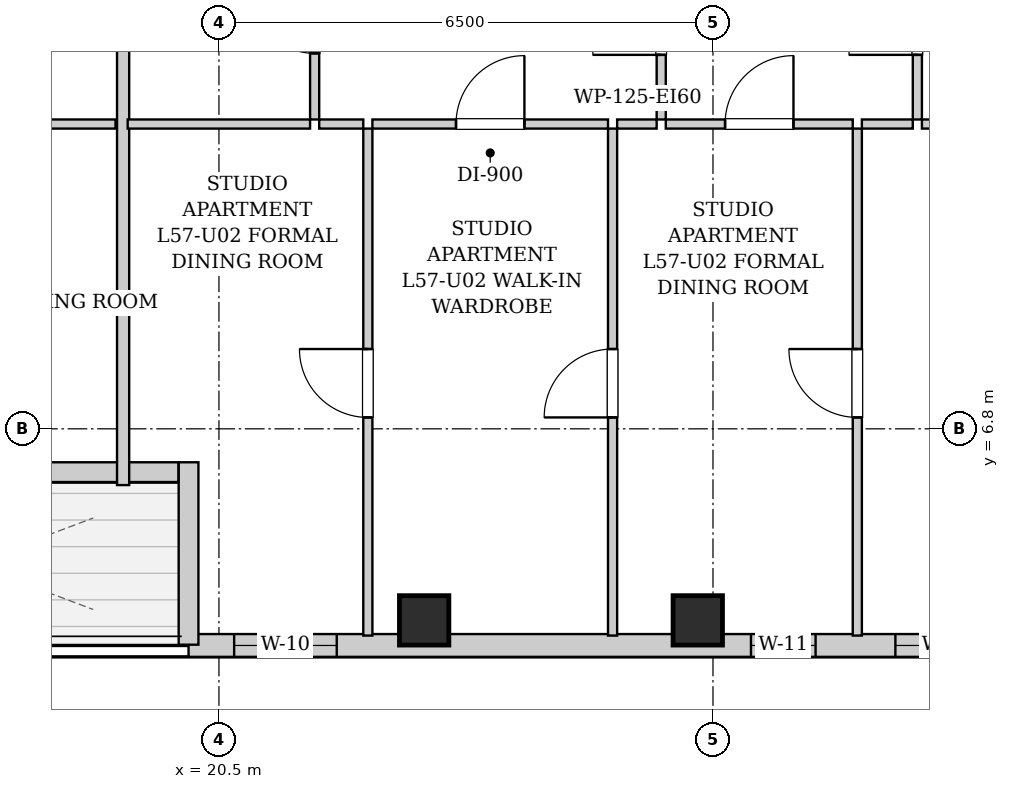
"""IFC4 building model, lengths in metres.
Left out: names, types, materials, properties, quantities, classifications, styles, units other than length and angle.
Written with IfcOpenShell. Run it as: python <this file> out.ifc"""

import sys

from ifc_helpers import new_model, si_unit, direction, frame, frame_2d, origin, origin_2d, place, context, subcontext, project, spatial, rectangle, extrude, element, fill, save


model = new_model("IFC4")
c1 = context("Model", 3, precision=1e-05, world=origin(), true_north=direction((0.0, 1.0)))
c2 = subcontext(c1, "Body", "Model", "MODEL_VIEW")
j1 = project(units=[si_unit("LENGTHUNIT", "METRE"), si_unit("PLANEANGLEUNIT", "RADIAN")], contexts=[c1])
p1 = place(None, origin())
s1 = spatial("IfcSite", under=j1, at=p1, CompositionType="ELEMENT")
p2 = place(p1, origin())
s2 = spatial("IfcBuilding", under=s1, at=p2, CompositionType="ELEMENT")
p3 = place(p2, frame((0.0, 0.0, 197.5)))
s3 = spatial("IfcBuildingStorey", under=s2, at=p3, CompositionType="ELEMENT", Elevation=197.5)
for number, where, z_axis, x_axis in (
    (1, (23.2, 4.28, 0.0), (0.0, 0.0, 1.0), (1.0, 0.0, 0.0)),
    (2, (26.8, 4.28, 0.0), (0.0, 0.0, 1.0), (1.0, 0.0, 0.0)),
):
    element("IfcColumn", number, at=place(p3, frame(where, z_axis=z_axis, x_axis=x_axis)), inside=s3, PredefinedType="COLUMN", context=c2, shape_type="SweptSolid", body=[
        extrude(rectangle(XDim=0.65, YDim=0.65, at=origin_2d()), origin(), (0.0, 0.0, 1.0), 3.3),
    ])
p4 = place(p3, frame((31.5, 3.95, 0.0), z_axis=(0.0, 0.0, 1.0), x_axis=(-1.0, 0.0, 0.0)))
e3 = element("IfcWall", 3, at=p4, inside=s3, PredefinedType="SOLIDWALL", context=c2, shape_type="SweptSolid", body=[
    extrude(rectangle(XDim=11.4, YDim=0.3, at=frame_2d((5.7, 0.0))), origin(), (0.0, 0.0, 1.0), 3.04),
])
p5 = place(p4, frame((9.45, 0.0, 0.55)))
e4 = element("IfcOpeningElement", 4, at=p5, cuts=e3, PredefinedType="OPENING", context=c2, shape_type="SweptSolid", body=[
    extrude(rectangle(XDim=1.35, YDim=1.2, at=frame_2d((0.675, 0.6))), frame((0.0, 0.16, 0.0), z_axis=(0.0, -1.0, 0.0), x_axis=(1.0, 0.0, 0.0)), (0.0, 0.0, 1.0), 0.32),
])
p6 = place(p4, frame((3.15, 0.0, 0.55)))
e5 = element("IfcOpeningElement", 5, at=p6, cuts=e3, PredefinedType="OPENING", context=c2, shape_type="SweptSolid", body=[
    extrude(rectangle(XDim=0.85, YDim=1.2, at=frame_2d((0.425, 0.6))), frame((0.0, 0.16, 0.0), z_axis=(0.0, -1.0, 0.0), x_axis=(1.0, 0.0, 0.0)), (0.0, 0.0, 1.0), 0.32),
])
p7 = place(p4, frame((0.75, 0.0, 0.55)))
e6 = element("IfcOpeningElement", 6, at=p7, cuts=e3, PredefinedType="OPENING", context=c2, shape_type="SweptSolid", body=[
    extrude(rectangle(XDim=1.35, YDim=1.2, at=frame_2d((0.675, 0.6))), frame((0.0, 0.16, 0.0), z_axis=(0.0, -1.0, 0.0), x_axis=(1.0, 0.0, 0.0)), (0.0, 0.0, 1.0), 0.32),
])
p8 = place(p3, frame((20.1, 3.96, 0.0), z_axis=(0.0, 0.0, 1.0), x_axis=(0.0, 1.0, 0.0)))
e7 = element("IfcWall", 7, at=p8, inside=s3, PredefinedType="SOLIDWALL", context=c2, shape_type="SweptSolid", body=[
    extrude(rectangle(XDim=2.4, YDim=0.26, at=frame_2d((1.2, 0.0))), origin(), (0.0, 0.0, 1.0), 3.04),
])
p9 = place(p3, frame((19.966, 6.23, 0.0), z_axis=(0.0, 0.0, 1.0), x_axis=(-1.0, 0.0, 0.0)))
e8 = element("IfcWall", 8, at=p9, inside=s3, PredefinedType="SOLIDWALL", context=c2, shape_type="SweptSolid", body=[
    extrude(rectangle(XDim=5.432, YDim=0.26, at=frame_2d((2.716, 0.0))), origin(), (0.0, 0.0, 1.0), 3.04),
])
p10 = place(p9, frame((2.166, 0.0, 0.0)))
e9 = element("IfcOpeningElement", 9, at=p10, cuts=e8, PredefinedType="OPENING", context=c2, shape_type="SweptSolid", body=[
    extrude(rectangle(XDim=1.1, YDim=2.0, at=frame_2d((0.55, 1.0))), frame((0.0, 0.14, 0.0), z_axis=(0.0, -1.0, 0.0), x_axis=(1.0, 0.0, 0.0)), (0.0, 0.0, 1.0), 0.28),
])
p11 = place(p3, frame((15.15, 10.81, 0.0), z_axis=(0.0, 0.0, 1.0), x_axis=(1.0, 0.0, 0.0)))
e10 = element("IfcWall", 10, at=p11, inside=s3, PredefinedType="PARTITIONING", context=c2, shape_type="SweptSolid", body=[
    extrude(rectangle(XDim=3.989, YDim=0.12, at=frame_2d((1.995, 0.0))), origin(), (0.0, 0.0, 1.0), 3.04),
])
p12 = place(p11, frame((1.544, 0.0, 0.0)))
e11 = element("IfcOpeningElement", 11, at=p12, cuts=e10, PredefinedType="OPENING", context=c2, shape_type="SweptSolid", body=[
    extrude(rectangle(XDim=0.9, YDim=2.05, at=frame_2d((0.45, 1.025))), frame((0.0, 0.07, 0.0), z_axis=(0.0, -1.0, 0.0), x_axis=(1.0, 0.0, 0.0)), (0.0, 0.0, 1.0), 0.14),
])
p13 = place(p3, frame((19.239, 6.06, 0.0), z_axis=(0.0, 0.0, 1.0), x_axis=(0.0, 1.0, 0.0)))
e12 = element("IfcWall", 12, at=p13, inside=s3, PredefinedType="PARTITIONING", context=c2, shape_type="SweptSolid", body=[
    extrude(rectangle(XDim=7.41, YDim=0.16, at=frame_2d((3.705, 0.0))), origin(), (0.0, 0.0, 1.0), 3.04),
])
p14 = place(p3, frame((21.759, 10.87, 0.0), z_axis=(0.0, 0.0, 1.0), x_axis=(0.0, 1.0, 0.0)))
e13 = element("IfcWall", 13, at=p14, inside=s3, PredefinedType="PARTITIONING", context=c2, shape_type="SweptSolid", body=[
    extrude(rectangle(XDim=2.6, YDim=0.12, at=frame_2d((1.3, 0.0))), origin(), (0.0, 0.0, 1.0), 3.04),
])
p15 = place(p14, frame((0.87, 0.0, 0.0)))
e14 = element("IfcOpeningElement", 14, at=p15, cuts=e13, PredefinedType="OPENING", context=c2, shape_type="SweptSolid", body=[
    extrude(rectangle(XDim=0.86, YDim=2.05, at=frame_2d((0.43, 1.025))), frame((0.0, 0.07, 0.0), z_axis=(0.0, -1.0, 0.0), x_axis=(1.0, 0.0, 0.0)), (0.0, 0.0, 1.0), 0.14),
])
p16 = place(p3, frame((19.299, 10.81, 0.0), z_axis=(0.0, 0.0, 1.0), x_axis=(1.0, 0.0, 0.0)))
e15 = element("IfcWall", 15, at=p16, inside=s3, PredefinedType="PARTITIONING", context=c2, shape_type="SweptSolid", body=[
    extrude(rectangle(XDim=2.4, YDim=0.12, at=frame_2d((1.2, 0.0))), origin(), (0.0, 0.0, 1.0), 3.04),
])
p17 = place(p3, frame((26.319, 10.87, 0.0), z_axis=(0.0, 0.0, 1.0), x_axis=(0.0, 1.0, 0.0)))
e16 = element("IfcWall", 16, at=p17, inside=s3, PredefinedType="PARTITIONING", context=c2, shape_type="SweptSolid", body=[
    extrude(rectangle(XDim=2.6, YDim=0.12, at=frame_2d((1.3, 0.0))), origin(), (0.0, 0.0, 1.0), 3.04),
])
p18 = place(p17, frame((0.85, 0.0, 0.0)))
e17 = element("IfcOpeningElement", 17, at=p18, cuts=e16, PredefinedType="OPENING", context=c2, shape_type="SweptSolid", body=[
    extrude(rectangle(XDim=0.9, YDim=2.05, at=frame_2d((0.45, 1.025))), frame((0.0, 0.07, 0.0), z_axis=(0.0, -1.0, 0.0), x_axis=(1.0, 0.0, 0.0)), (0.0, 0.0, 1.0), 0.14),
])
p19 = place(p3, frame((21.819, 10.81, 0.0), z_axis=(0.0, 0.0, 1.0), x_axis=(1.0, 0.0, 0.0)))
e18 = element("IfcWall", 18, at=p19, inside=s3, PredefinedType="PARTITIONING", context=c2, shape_type="SweptSolid", body=[
    extrude(rectangle(XDim=0.58, YDim=0.12, at=frame_2d((0.29, 0.0))), origin(), (0.0, 0.0, 1.0), 3.04),
])
p20 = place(p3, frame((22.519, 10.81, 0.0), z_axis=(0.0, 0.0, 1.0), x_axis=(1.0, 0.0, 0.0)))
e19 = element("IfcWall", 19, at=p20, inside=s3, PredefinedType="PARTITIONING", context=c2, shape_type="SweptSolid", body=[
    extrude(rectangle(XDim=3.1, YDim=0.12, at=frame_2d((1.55, 0.0))), origin(), (0.0, 0.0, 1.0), 3.04),
])
p21 = place(p20, frame((1.1, 0.0, 0.0)))
e20 = element("IfcOpeningElement", 20, at=p21, cuts=e19, PredefinedType="OPENING", context=c2, shape_type="SweptSolid", body=[
    extrude(rectangle(XDim=0.9, YDim=2.05, at=frame_2d((0.45, 1.025))), frame((0.0, 0.07, 0.0), z_axis=(0.0, -1.0, 0.0), x_axis=(1.0, 0.0, 0.0)), (0.0, 0.0, 1.0), 0.14),
])
p22 = place(p3, frame((25.739, 10.81, 0.0), z_axis=(0.0, 0.0, 1.0), x_axis=(1.0, 0.0, 0.0)))
e21 = element("IfcWall", 21, at=p22, inside=s3, PredefinedType="PARTITIONING", context=c2, shape_type="SweptSolid", body=[
    extrude(rectangle(XDim=0.52, YDim=0.12, at=frame_2d((0.26, 0.0))), origin(), (0.0, 0.0, 1.0), 3.04),
])
p23 = place(p3, frame((29.689, 10.87, 0.0), z_axis=(0.0, 0.0, 1.0), x_axis=(0.0, 1.0, 0.0)))
e22 = element("IfcWall", 22, at=p23, inside=s3, PredefinedType="PARTITIONING", context=c2, shape_type="SweptSolid", body=[
    extrude(rectangle(XDim=2.6, YDim=0.12, at=frame_2d((1.3, 0.0))), origin(), (0.0, 0.0, 1.0), 3.04),
])
p24 = place(p23, frame((0.85, 0.0, 0.0)))
e23 = element("IfcOpeningElement", 23, at=p24, cuts=e22, PredefinedType="OPENING", context=c2, shape_type="SweptSolid", body=[
    extrude(rectangle(XDim=0.9, YDim=2.05, at=frame_2d((0.45, 1.025))), frame((0.0, 0.07, 0.0), z_axis=(0.0, -1.0, 0.0), x_axis=(1.0, 0.0, 0.0)), (0.0, 0.0, 1.0), 0.14),
])
p25 = place(p3, frame((26.379, 10.81, 0.0), z_axis=(0.0, 0.0, 1.0), x_axis=(1.0, 0.0, 0.0)))
e24 = element("IfcWall", 24, at=p25, inside=s3, PredefinedType="PARTITIONING", context=c2, shape_type="SweptSolid", body=[
    extrude(rectangle(XDim=2.46, YDim=0.12, at=frame_2d((1.23, 0.0))), origin(), (0.0, 0.0, 1.0), 3.04),
])
p26 = place(p25, frame((0.78, 0.0, 0.0)))
e25 = element("IfcOpeningElement", 25, at=p26, cuts=e24, PredefinedType="OPENING", context=c2, shape_type="SweptSolid", body=[
    extrude(rectangle(XDim=0.9, YDim=2.05, at=frame_2d((0.45, 1.025))), frame((0.0, 0.07, 0.0), z_axis=(0.0, -1.0, 0.0), x_axis=(1.0, 0.0, 0.0)), (0.0, 0.0, 1.0), 0.14),
])
p27 = place(p3, frame((28.959, 10.81, 0.0), z_axis=(0.0, 0.0, 1.0), x_axis=(1.0, 0.0, 0.0)))
e26 = element("IfcWall", 26, at=p27, inside=s3, PredefinedType="PARTITIONING", context=c2, shape_type="SweptSolid", body=[
    extrude(rectangle(XDim=0.67, YDim=0.12, at=frame_2d((0.335, 0.0))), origin(), (0.0, 0.0, 1.0), 3.04),
])
p28 = place(p3, frame((29.749, 10.81, 0.0), z_axis=(0.0, 0.0, 1.0), x_axis=(1.0, 0.0, 0.0)))
e27 = element("IfcWall", 27, at=p28, inside=s3, PredefinedType="PARTITIONING", context=c2, shape_type="SweptSolid", body=[
    extrude(rectangle(XDim=2.31, YDim=0.12, at=frame_2d((1.155, 0.0))), origin(), (0.0, 0.0, 1.0), 3.04),
])
p29 = place(p28, frame((0.705, 0.0, 0.0)))
e28 = element("IfcOpeningElement", 28, at=p29, cuts=e27, PredefinedType="OPENING", context=c2, shape_type="SweptSolid", body=[
    extrude(rectangle(XDim=0.9, YDim=2.05, at=frame_2d((0.45, 1.025))), frame((0.0, 0.07, 0.0), z_axis=(0.0, -1.0, 0.0), x_axis=(1.0, 0.0, 0.0)), (0.0, 0.0, 1.0), 0.14),
])
p30 = place(p3, frame((22.459, 4.08, 0.0), z_axis=(0.0, 0.0, 1.0), x_axis=(0.0, 1.0, 0.0)))
e29 = element("IfcWall", 29, at=p30, inside=s3, PredefinedType="PARTITIONING", context=c2, shape_type="SweptSolid", body=[
    extrude(rectangle(XDim=6.67, YDim=0.12, at=frame_2d((3.335, 0.0))), origin(), (0.0, 0.0, 1.0), 3.04),
])
p31 = place(p30, frame((2.87, 0.0, 0.0)))
e30 = element("IfcOpeningElement", 30, at=p31, cuts=e29, PredefinedType="OPENING", context=c2, shape_type="SweptSolid", body=[
    extrude(rectangle(XDim=0.9, YDim=2.05, at=frame_2d((0.45, 1.025))), frame((0.0, 0.07, 0.0), z_axis=(0.0, -1.0, 0.0), x_axis=(1.0, 0.0, 0.0)), (0.0, 0.0, 1.0), 0.14),
])
p32 = place(p3, frame((25.679, 4.08, 0.0), z_axis=(0.0, 0.0, 1.0), x_axis=(0.0, 1.0, 0.0)))
e31 = element("IfcWall", 31, at=p32, inside=s3, PredefinedType="PARTITIONING", context=c2, shape_type="SweptSolid", body=[
    extrude(rectangle(XDim=6.67, YDim=0.12, at=frame_2d((3.335, 0.0))), origin(), (0.0, 0.0, 1.0), 3.04),
])
p33 = place(p32, frame((2.87, 0.0, 0.0)))
e32 = element("IfcOpeningElement", 32, at=p33, cuts=e31, PredefinedType="OPENING", context=c2, shape_type="SweptSolid", body=[
    extrude(rectangle(XDim=0.9, YDim=2.05, at=frame_2d((0.45, 1.025))), frame((0.0, 0.07, 0.0), z_axis=(0.0, -1.0, 0.0), x_axis=(1.0, 0.0, 0.0)), (0.0, 0.0, 1.0), 0.14),
])
p34 = place(p3, frame((28.899, 4.08, 0.0), z_axis=(0.0, 0.0, 1.0), x_axis=(0.0, 1.0, 0.0)))
e33 = element("IfcWall", 33, at=p34, inside=s3, PredefinedType="PARTITIONING", context=c2, shape_type="SweptSolid", body=[
    extrude(rectangle(XDim=6.67, YDim=0.12, at=frame_2d((3.335, 0.0))), origin(), (0.0, 0.0, 1.0), 3.04),
])
p35 = place(p34, frame((2.87, 0.0, 0.0)))
e34 = element("IfcOpeningElement", 34, at=p35, cuts=e33, PredefinedType="OPENING", context=c2, shape_type="SweptSolid", body=[
    extrude(rectangle(XDim=0.9, YDim=2.05, at=frame_2d((0.45, 1.025))), frame((0.0, 0.07, 0.0), z_axis=(0.0, -1.0, 0.0), x_axis=(1.0, 0.0, 0.0)), (0.0, 0.0, 1.0), 0.14),
])
p36 = place(p15, origin())
e35 = element("IfcDoor", 35, at=p36, inside=s3, OperationType="SINGLE_SWING_RIGHT", PredefinedType="DOOR", context=c2, shape_type="SweptSolid", body=[
    extrude(rectangle(XDim=0.86, YDim=2.05, at=frame_2d((0.43, 1.025))), frame((0.0, 0.025, 0.0), z_axis=(0.0, -1.0, 0.0), x_axis=(1.0, 0.0, 0.0)), (0.0, 0.0, 1.0), 0.05),
])
fill(e14, e35)
p37 = place(p18, origin())
e36 = element("IfcDoor", 36, at=p37, inside=s3, OperationType="SINGLE_SWING_LEFT", PredefinedType="DOOR", context=c2, shape_type="SweptSolid", body=[
    extrude(rectangle(XDim=0.9, YDim=2.05, at=frame_2d((0.45, 1.025))), frame((0.0, 0.025, 0.0), z_axis=(0.0, -1.0, 0.0), x_axis=(1.0, 0.0, 0.0)), (0.0, 0.0, 1.0), 0.05),
])
fill(e17, e36)
p38 = place(p21, origin())
e37 = element("IfcDoor", 37, at=p38, inside=s3, OperationType="SINGLE_SWING_RIGHT", PredefinedType="DOOR", context=c2, shape_type="SweptSolid", body=[
    extrude(rectangle(XDim=0.9, YDim=2.05, at=frame_2d((0.45, 1.025))), frame((0.0, 0.025, 0.0), z_axis=(0.0, -1.0, 0.0), x_axis=(1.0, 0.0, 0.0)), (0.0, 0.0, 1.0), 0.05),
])
fill(e20, e37)
p39 = place(p24, origin())
e38 = element("IfcDoor", 38, at=p39, inside=s3, OperationType="SINGLE_SWING_LEFT", PredefinedType="DOOR", context=c2, shape_type="SweptSolid", body=[
    extrude(rectangle(XDim=0.9, YDim=2.05, at=frame_2d((0.45, 1.025))), frame((0.0, 0.025, 0.0), z_axis=(0.0, -1.0, 0.0), x_axis=(1.0, 0.0, 0.0)), (0.0, 0.0, 1.0), 0.05),
])
fill(e23, e38)
p40 = place(p26, origin())
e39 = element("IfcDoor", 39, at=p40, inside=s3, OperationType="SINGLE_SWING_RIGHT", PredefinedType="DOOR", context=c2, shape_type="SweptSolid", body=[
    extrude(rectangle(XDim=0.9, YDim=2.05, at=frame_2d((0.45, 1.025))), frame((0.0, 0.025, 0.0), z_axis=(0.0, -1.0, 0.0), x_axis=(1.0, 0.0, 0.0)), (0.0, 0.0, 1.0), 0.05),
])
fill(e25, e39)
p41 = place(p31, origin())
e40 = element("IfcDoor", 40, at=p41, inside=s3, OperationType="SINGLE_SWING_RIGHT", PredefinedType="DOOR", context=c2, shape_type="SweptSolid", body=[
    extrude(rectangle(XDim=0.9, YDim=2.05, at=frame_2d((0.45, 1.025))), frame((0.0, 0.025, 0.0), z_axis=(0.0, -1.0, 0.0), x_axis=(1.0, 0.0, 0.0)), (0.0, 0.0, 1.0), 0.05),
])
fill(e30, e40)
p42 = place(p33, origin())
e41 = element("IfcDoor", 41, at=p42, inside=s3, OperationType="SINGLE_SWING_LEFT", PredefinedType="DOOR", context=c2, shape_type="SweptSolid", body=[
    extrude(rectangle(XDim=0.9, YDim=2.05, at=frame_2d((0.45, 1.025))), frame((0.0, 0.025, 0.0), z_axis=(0.0, -1.0, 0.0), x_axis=(1.0, 0.0, 0.0)), (0.0, 0.0, 1.0), 0.05),
])
fill(e32, e41)
p43 = place(p35, origin())
e42 = element("IfcDoor", 42, at=p43, inside=s3, OperationType="SINGLE_SWING_RIGHT", PredefinedType="DOOR", context=c2, shape_type="SweptSolid", body=[
    extrude(rectangle(XDim=0.9, YDim=2.05, at=frame_2d((0.45, 1.025))), frame((0.0, 0.025, 0.0), z_axis=(0.0, -1.0, 0.0), x_axis=(1.0, 0.0, 0.0)), (0.0, 0.0, 1.0), 0.05),
])
fill(e34, e42)
p44 = place(p5, origin())
e43 = element("IfcWindow", 43, at=p44, inside=s3, PartitioningType="SINGLE_PANEL", PredefinedType="WINDOW", context=c2, shape_type="SweptSolid", body=[
    extrude(rectangle(XDim=1.35, YDim=1.2, at=frame_2d((0.675, 0.6))), frame((0.0, 0.03, 0.0), z_axis=(0.0, -1.0, 0.0), x_axis=(1.0, 0.0, 0.0)), (0.0, 0.0, 1.0), 0.06),
])
fill(e4, e43)
p45 = place(p6, origin())
e44 = element("IfcWindow", 44, at=p45, inside=s3, PartitioningType="SINGLE_PANEL", PredefinedType="WINDOW", context=c2, shape_type="SweptSolid", body=[
    extrude(rectangle(XDim=0.85, YDim=1.2, at=frame_2d((0.425, 0.6))), frame((0.0, 0.03, 0.0), z_axis=(0.0, -1.0, 0.0), x_axis=(1.0, 0.0, 0.0)), (0.0, 0.0, 1.0), 0.06),
])
fill(e5, e44)
p46 = place(p7, origin())
e45 = element("IfcWindow", 45, at=p46, inside=s3, PartitioningType="SINGLE_PANEL", PredefinedType="WINDOW", context=c2, shape_type="SweptSolid", body=[
    extrude(rectangle(XDim=1.35, YDim=1.2, at=frame_2d((0.675, 0.6))), frame((0.0, 0.03, 0.0), z_axis=(0.0, -1.0, 0.0), x_axis=(1.0, 0.0, 0.0)), (0.0, 0.0, 1.0), 0.06),
])
fill(e6, e45)
save(model, sys.argv[1])
